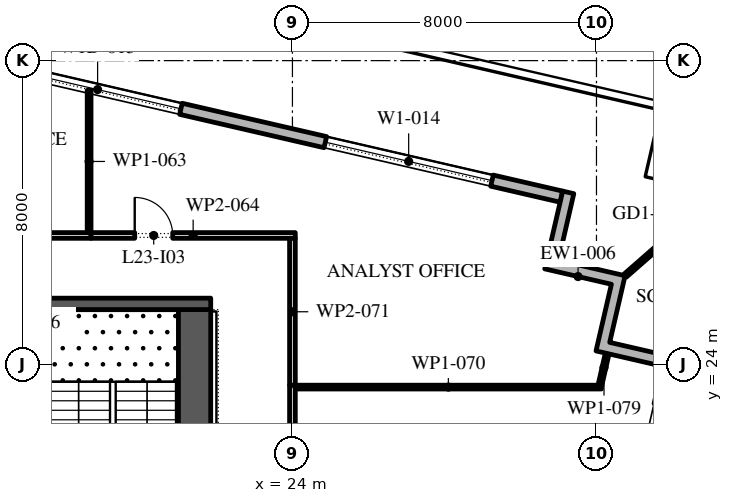
"""IFC4 building model, lengths in metres.
Left out: names, types, materials, properties, quantities, classifications, styles, units other than length and angle.
Written with IfcOpenShell. Run it as: python <this file> out.ifc"""

import sys

from ifc_helpers import new_model, si_unit, direction, frame, frame_2d, origin, place, context, subcontext, project, spatial, polyline, rectangle, outline, extrude, element, fill, save


model = new_model("IFC4")
c1 = context("Model", 3, precision=1e-05, world=origin(), true_north=direction((0.0, 1.0)))
c2 = subcontext(c1, "Body", "Model", "MODEL_VIEW")
j1 = project(units=[si_unit("LENGTHUNIT", "METRE"), si_unit("PLANEANGLEUNIT", "RADIAN")], contexts=[c1])
p1 = place(None, origin())
s1 = spatial("IfcSite", under=j1, at=p1, CompositionType="ELEMENT")
p2 = place(p1, origin())
s2 = spatial("IfcBuilding", under=s1, at=p2, CompositionType="ELEMENT")
p3 = place(p2, frame((0.0, 0.0, 109.8)))
s3 = spatial("IfcBuildingStorey", under=s2, at=p3, CompositionType="ELEMENT", Elevation=109.8)
p4 = place(p3, frame((22.82, -24.016, 0.0), z_axis=(0.0, 0.0, 1.0), x_axis=(0.224953880882, 0.974369412223, 0.0)))
e1 = element("IfcWall", 1, at=p4, inside=s3, PredefinedType="STANDARD", context=c2, shape_type="SweptSolid", body=[
    extrude(rectangle(XDim=49.5, YDim=0.3, at=frame_2d((24.75, 0.0))), origin(), (0.0, 0.0, 1.0), 4.0),
])
p5 = place(p4, frame((1.157, 0.0, 0.45)))
e2 = element("IfcOpeningElement", 2, at=p5, cuts=e1, PredefinedType="OPENING", context=c2, shape_type="SweptSolid", body=[
    extrude(rectangle(XDim=4.5, YDim=3.05, at=frame_2d((2.25, 1.525))), frame((0.0, 0.16, 0.0), z_axis=(0.0, -1.0, 0.0), x_axis=(1.0, 0.0, 0.0)), (0.0, 0.0, 1.0), 0.32),
])
p6 = place(p4, frame((8.121, 0.0, 0.45)))
e3 = element("IfcOpeningElement", 3, at=p6, cuts=e1, PredefinedType="OPENING", context=c2, shape_type="SweptSolid", body=[
    extrude(rectangle(XDim=4.5, YDim=3.05, at=frame_2d((2.25, 1.525))), frame((0.0, 0.16, 0.0), z_axis=(0.0, -1.0, 0.0), x_axis=(1.0, 0.0, 0.0)), (0.0, 0.0, 1.0), 0.32),
])
p7 = place(p4, frame((15.236, 0.0, 0.45)))
e4 = element("IfcOpeningElement", 4, at=p7, cuts=e1, PredefinedType="OPENING", context=c2, shape_type="SweptSolid", body=[
    extrude(rectangle(XDim=4.5, YDim=3.05, at=frame_2d((2.25, 1.525))), frame((0.0, 0.16, 0.0), z_axis=(0.0, -1.0, 0.0), x_axis=(1.0, 0.0, 0.0)), (0.0, 0.0, 1.0), 0.32),
])
p8 = place(p4, frame((23.4, 0.0, 0.0)))
e5 = element("IfcOpeningElement", 5, at=p8, cuts=e1, PredefinedType="OPENING", context=c2, shape_type="SweptSolid", body=[
    extrude(rectangle(XDim=2.4, YDim=3.5, at=frame_2d((1.2, 1.75))), frame((0.0, 0.16, 0.0), z_axis=(0.0, -1.0, 0.0), x_axis=(1.0, 0.0, 0.0)), (0.0, 0.0, 1.0), 0.32),
])
p9 = place(p4, frame((29.464, 0.0, 0.45)))
e6 = element("IfcOpeningElement", 6, at=p9, cuts=e1, PredefinedType="OPENING", context=c2, shape_type="SweptSolid", body=[
    extrude(rectangle(XDim=4.5, YDim=2.875, at=frame_2d((2.25, 1.438))), frame((0.0, 0.16, 0.0), z_axis=(0.0, -1.0, 0.0), x_axis=(1.0, 0.0, 0.0)), (0.0, 0.0, 1.0), 0.32),
])
p10 = place(p4, frame((36.579, 0.0, 0.45)))
e7 = element("IfcOpeningElement", 7, at=p10, cuts=e1, PredefinedType="OPENING", context=c2, shape_type="SweptSolid", body=[
    extrude(rectangle(XDim=4.5, YDim=2.825, at=frame_2d((2.25, 1.413))), frame((0.0, 0.16, 0.0), z_axis=(0.0, -1.0, 0.0), x_axis=(1.0, 0.0, 0.0)), (0.0, 0.0, 1.0), 0.32),
])
p11 = place(p4, frame((43.693, 0.0, 0.45)))
e8 = element("IfcOpeningElement", 8, at=p11, cuts=e1, PredefinedType="OPENING", context=c2, shape_type="SweptSolid", body=[
    extrude(rectangle(XDim=4.5, YDim=2.75, at=frame_2d((2.25, 1.375))), frame((0.0, 0.16, 0.0), z_axis=(0.0, -1.0, 0.0), x_axis=(1.0, 0.0, 0.0)), (0.0, 0.0, 1.0), 0.32),
])
p12 = place(p3, frame((31.078, 28.421, 0.0), z_axis=(0.0, 0.0, 1.0), x_axis=(-0.974370456532, 0.224949357493, 0.0)))
e9 = element("IfcWall", 9, at=p12, inside=s3, PredefinedType="STANDARD", context=c2, shape_type="SweptSolid", body=[
    extrude(rectangle(XDim=51.0, YDim=0.3, at=frame_2d((25.5, 0.0))), origin(), (0.0, 0.0, 1.0), 4.0),
])
p13 = place(p12, frame((1.875, 0.0, 0.45)))
e10 = element("IfcOpeningElement", 10, at=p13, cuts=e9, PredefinedType="OPENING", context=c2, shape_type="SweptSolid", body=[
    extrude(rectangle(XDim=4.5, YDim=3.05, at=frame_2d((2.25, 1.525))), frame((0.0, 0.16, 0.0), z_axis=(0.0, -1.0, 0.0), x_axis=(1.0, 0.0, 0.0)), (0.0, 0.0, 1.0), 0.32),
])
p14 = place(p12, frame((10.275, 0.0, 0.45)))
e11 = element("IfcOpeningElement", 11, at=p14, cuts=e9, PredefinedType="OPENING", context=c2, shape_type="SweptSolid", body=[
    extrude(rectangle(XDim=4.5, YDim=2.875, at=frame_2d((2.25, 1.438))), frame((0.0, 0.16, 0.0), z_axis=(0.0, -1.0, 0.0), x_axis=(1.0, 0.0, 0.0)), (0.0, 0.0, 1.0), 0.32),
])
p15 = place(p12, frame((18.825, 0.0, 0.45)))
e12 = element("IfcOpeningElement", 12, at=p15, cuts=e9, PredefinedType="OPENING", context=c2, shape_type="SweptSolid", body=[
    extrude(rectangle(XDim=4.5, YDim=2.875, at=frame_2d((2.25, 1.438))), frame((0.0, 0.16, 0.0), z_axis=(0.0, -1.0, 0.0), x_axis=(1.0, 0.0, 0.0)), (0.0, 0.0, 1.0), 0.32),
])
p16 = place(p12, frame((27.075, 0.0, 0.0)))
e13 = element("IfcOpeningElement", 13, at=p16, cuts=e9, PredefinedType="OPENING", context=c2, shape_type="SweptSolid", body=[
    extrude(rectangle(XDim=2.4, YDim=3.2, at=frame_2d((1.2, 1.6))), frame((0.0, 0.16, 0.0), z_axis=(0.0, -1.0, 0.0), x_axis=(1.0, 0.0, 0.0)), (0.0, 0.0, 1.0), 0.32),
])
p17 = place(p12, frame((35.925, 0.0, 0.45)))
e14 = element("IfcOpeningElement", 14, at=p17, cuts=e9, PredefinedType="OPENING", context=c2, shape_type="SweptSolid", body=[
    extrude(rectangle(XDim=4.5, YDim=2.675, at=frame_2d((2.25, 1.337))), frame((0.0, 0.16, 0.0), z_axis=(0.0, -1.0, 0.0), x_axis=(1.0, 0.0, 0.0)), (0.0, 0.0, 1.0), 0.32),
])
p18 = place(p12, frame((44.475, 0.0, 0.45)))
e15 = element("IfcOpeningElement", 15, at=p18, cuts=e9, PredefinedType="OPENING", context=c2, shape_type="SweptSolid", body=[
    extrude(rectangle(XDim=4.5, YDim=3.05, at=frame_2d((2.25, 1.525))), frame((0.0, 0.16, 0.0), z_axis=(0.0, -1.0, 0.0), x_axis=(1.0, 0.0, 0.0)), (0.0, 0.0, 1.0), 0.32),
])
p19 = place(p3, origin())
e16 = element("IfcWall", 16, at=p19, inside=s3, PredefinedType="STANDARD", context=c2, shape_type="SweptSolid", body=[
    extrude(outline(polyline([(32.393, 26.116), (30.639, 26.521), (31.111, 28.567), (31.404, 28.5), (30.999, 26.746), (32.753, 26.341), (32.348, 24.587), (33.809, 24.25), (33.742, 23.957), (31.988, 24.362), (32.393, 26.116)])), origin(), (0.0, 0.0, 1.0), 4.0),
])
p20 = place(p3, frame((32.753, 26.341, -0.05), z_axis=(0.0, 0.0, 1.0), x_axis=(0.752438025347, 0.658663053474, 0.0)))
e17 = element("IfcWall", 17, at=p20, inside=s3, PredefinedType="STANDARD", context=c2, shape_type="SweptSolid", body=[
    extrude(rectangle(XDim=3.163, YDim=0.1, at=frame_2d((1.582, 0.0))), origin(), (0.0, 0.0, 1.0), 4.05),
])
p21 = place(p3, frame((21.425, -2.45, 0.0), z_axis=(0.0, 0.0, 1.0), x_axis=(0.0, 1.0, 0.0)))
e18 = element("IfcWall", 18, at=p21, inside=s3, PredefinedType="SHEAR", context=c2, shape_type="SweptSolid", body=[
    extrude(rectangle(XDim=27.9, YDim=0.85, at=frame_2d((13.95, 0.0))), origin(), (0.0, 0.0, 1.0), 4.0),
])
p22 = place(p21, frame((5.05, 0.0, 0.0)))
e19 = element("IfcOpeningElement", 19, at=p22, cuts=e18, PredefinedType="OPENING", context=c2, shape_type="SweptSolid", body=[
    extrude(rectangle(XDim=1.2, YDim=2.1, at=frame_2d((0.6, 1.05))), frame((0.0, 0.435, 0.0), z_axis=(0.0, -1.0, 0.0), x_axis=(1.0, 0.0, 0.0)), (0.0, 0.0, 1.0), 0.87),
])
p23 = place(p21, frame((21.65, 0.0, 0.0)))
e20 = element("IfcOpeningElement", 20, at=p23, cuts=e18, PredefinedType="OPENING", context=c2, shape_type="SweptSolid", body=[
    extrude(rectangle(XDim=1.2, YDim=2.1, at=frame_2d((0.6, 1.05))), frame((0.0, 0.435, 0.0), z_axis=(0.0, -1.0, 0.0), x_axis=(1.0, 0.0, 0.0)), (0.0, 0.0, 1.0), 0.87),
])
p24 = place(p3, frame((10.15, 25.6, 0.0), z_axis=(0.0, 0.0, 1.0), x_axis=(1.0, 0.0, 0.0)))
e21 = element("IfcWall", 21, at=p24, inside=s3, PredefinedType="SHEAR", context=c2, shape_type="SweptSolid", body=[
    extrude(rectangle(XDim=11.7, YDim=0.3, at=frame_2d((5.85, 0.0))), origin(), (0.0, 0.0, 1.0), 4.0),
])
p25 = place(p3, frame((10.32, 27.4, 0.0), z_axis=(0.0, 0.0, 1.0), x_axis=(1.0, 0.0, 0.0)))
e22 = element("IfcWall", 22, at=p25, inside=s3, PredefinedType="PARTITIONING", context=c2, shape_type="SweptSolid", body=[
    extrude(rectangle(XDim=8.38, YDim=0.15, at=frame_2d((4.19, 0.0))), origin(), (0.0, 0.0, 1.0), 4.0),
])
p26 = place(p25, frame((4.43, 0.0, 0.0)))
e23 = element("IfcOpeningElement", 23, at=p26, cuts=e22, PredefinedType="OPENING", context=c2, shape_type="SweptSolid", body=[
    extrude(rectangle(XDim=1.0, YDim=2.1, at=frame_2d((0.5, 1.05))), frame((0.0, 0.085, 0.0), z_axis=(0.0, -1.0, 0.0), x_axis=(1.0, 0.0, 0.0)), (0.0, 0.0, 1.0), 0.17),
])
p27 = place(p3, frame((18.65, 27.475, 0.0), z_axis=(0.0, 0.0, 1.0), x_axis=(0.0, 1.0, 0.0)))
e24 = element("IfcWall", 24, at=p27, inside=s3, PredefinedType="PARTITIONING", context=c2, shape_type="SweptSolid", body=[
    extrude(rectangle(XDim=3.744, YDim=0.1, at=frame_2d((1.872, 0.0))), origin(), (0.0, 0.0, 1.0), 4.0),
])
p28 = place(p3, frame((18.7, 27.4, 0.0), z_axis=(0.0, 0.0, 1.0), x_axis=(1.0, 0.0, 0.0)))
e25 = element("IfcWall", 25, at=p28, inside=s3, PredefinedType="PARTITIONING", context=c2, shape_type="SweptSolid", body=[
    extrude(rectangle(XDim=5.375, YDim=0.15, at=frame_2d((2.688, 0.0))), origin(), (0.0, 0.0, 1.0), 4.0),
])
p29 = place(p28, frame((1.15, 0.0, 0.0)))
e26 = element("IfcOpeningElement", 26, at=p29, cuts=e25, PredefinedType="OPENING", context=c2, shape_type="SweptSolid", body=[
    extrude(rectangle(XDim=1.0, YDim=2.1, at=frame_2d((0.5, 1.05))), frame((0.0, 0.085, 0.0), z_axis=(0.0, -1.0, 0.0), x_axis=(1.0, 0.0, 0.0)), (0.0, 0.0, 1.0), 0.17),
])
p30 = place(p3, frame((24.0, 23.46, 0.0), z_axis=(0.0, 0.0, 1.0), x_axis=(0.0, -1.0, 0.0)))
e27 = element("IfcWall", 27, at=p30, inside=s3, PredefinedType="PARTITIONING", context=c2, shape_type="SweptSolid", body=[
    extrude(rectangle(XDim=6.09, YDim=0.15, at=frame_2d((3.045, 0.0))), origin(), (0.0, 0.0, 1.0), 4.0),
])
p31 = place(p30, frame((2.49, 0.0, 0.0)))
e28 = element("IfcOpeningElement", 28, at=p31, cuts=e27, PredefinedType="OPENING", context=c2, shape_type="SweptSolid", body=[
    extrude(rectangle(XDim=1.0, YDim=2.1, at=frame_2d((0.5, 1.05))), frame((0.0, 0.085, 0.0), z_axis=(0.0, -1.0, 0.0), x_axis=(1.0, 0.0, 0.0)), (0.0, 0.0, 1.0), 0.17),
])
p32 = place(p3, frame((24.075, 23.41, 0.0), z_axis=(0.0, 0.0, 1.0), x_axis=(1.0, 0.0, 0.0)))
e29 = element("IfcWall", 29, at=p32, inside=s3, PredefinedType="PARTITIONING", context=c2, shape_type="SweptSolid", body=[
    extrude(rectangle(XDim=8.055, YDim=0.1, at=frame_2d((4.027, 0.0))), origin(), (0.0, 0.0, 1.0), 4.0),
])
p33 = place(p3, frame((24.0, 27.325, 0.0), z_axis=(0.0, 0.0, 1.0), x_axis=(0.0, -1.0, 0.0)))
e30 = element("IfcWall", 30, at=p33, inside=s3, PredefinedType="PARTITIONING", context=c2, shape_type="SweptSolid", body=[
    extrude(rectangle(XDim=3.865, YDim=0.15, at=frame_2d((1.933, 0.0))), origin(), (0.0, 0.0, 1.0), 4.0),
])
p34 = place(p3, frame((32.091, 23.459, 0.0), z_axis=(0.0, 0.0, 1.0), x_axis=(0.223406444343, 0.97472537703, 0.0)))
e31 = element("IfcWall", 31, at=p34, inside=s3, PredefinedType="PARTITIONING", context=c2, shape_type="SweptSolid", body=[
    extrude(rectangle(XDim=0.957, YDim=0.1, at=frame_2d((0.479, 0.0))), origin(), (0.0, 0.0, 1.0), 4.0),
])
p35 = place(p11, origin())
e32 = element("IfcWindow", 32, at=p35, inside=s3, PartitioningType="DOUBLE_PANEL_VERTICAL", PredefinedType="WINDOW", context=c2, shape_type="SweptSolid", body=[
    extrude(rectangle(XDim=4.5, YDim=2.75, at=frame_2d((2.25, 1.375))), frame((0.0, 0.03, 0.0), z_axis=(0.0, -1.0, 0.0), x_axis=(1.0, 0.0, 0.0)), (0.0, 0.0, 1.0), 0.06),
])
fill(e8, e32)
p36 = place(p13, origin())
e33 = element("IfcWindow", 33, at=p36, inside=s3, PartitioningType="DOUBLE_PANEL_VERTICAL", PredefinedType="WINDOW", context=c2, shape_type="SweptSolid", body=[
    extrude(rectangle(XDim=4.5, YDim=3.05, at=frame_2d((2.25, 1.525))), frame((0.0, 0.03, 0.0), z_axis=(0.0, -1.0, 0.0), x_axis=(1.0, 0.0, 0.0)), (0.0, 0.0, 1.0), 0.06),
])
fill(e10, e33)
p37 = place(p14, origin())
e34 = element("IfcWindow", 34, at=p37, inside=s3, PartitioningType="DOUBLE_PANEL_VERTICAL", PredefinedType="WINDOW", context=c2, shape_type="SweptSolid", body=[
    extrude(rectangle(XDim=4.5, YDim=2.875, at=frame_2d((2.25, 1.438))), frame((0.0, 0.03, 0.0), z_axis=(0.0, -1.0, 0.0), x_axis=(1.0, 0.0, 0.0)), (0.0, 0.0, 1.0), 0.06),
])
fill(e11, e34)
p38 = place(p29, origin())
e35 = element("IfcDoor", 35, at=p38, inside=s3, OperationType="SINGLE_SWING_RIGHT", PredefinedType="DOOR", context=c2, shape_type="SweptSolid", body=[
    extrude(rectangle(XDim=1.0, YDim=2.1, at=frame_2d((0.5, 1.05))), frame((0.0, 0.025, 0.0), z_axis=(0.0, -1.0, 0.0), x_axis=(1.0, 0.0, 0.0)), (0.0, 0.0, 1.0), 0.05),
])
fill(e26, e35)
save(model, sys.argv[1])
